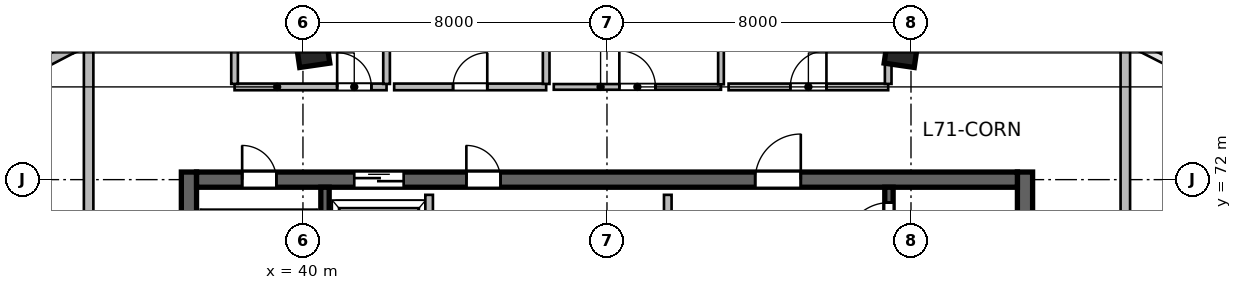
"""IFC4 building model, lengths in metres.
Left out: names, types, materials, properties, quantities, classifications, styles, units other than length and angle.
Written with IfcOpenShell. Run it as: python <this file> out.ifc"""

import sys

from ifc_helpers import new_model, si_unit, direction, frame, frame_2d, origin, origin_2d, place, context, subcontext, project, spatial, rectangle, extrude, source, transform, mapped, element, fill, save


model = new_model("IFC4")
c1 = context("Model", 3, precision=1e-05, world=origin(), true_north=direction((0.0, 1.0)))
c2 = subcontext(c1, "Body", "Model", "MODEL_VIEW")
j1 = project(units=[si_unit("LENGTHUNIT", "METRE"), si_unit("PLANEANGLEUNIT", "RADIAN")], contexts=[c1])
p1 = place(None, origin())
s1 = spatial("IfcSite", under=j1, at=p1, CompositionType="ELEMENT")
p2 = place(p1, origin())
s2 = spatial("IfcBuilding", under=s1, at=p2, CompositionType="ELEMENT")
p3 = place(p2, frame((0.0, 0.0, 291.3)))
s3 = spatial("IfcBuildingStorey", under=s2, at=p3, CompositionType="ELEMENT", Elevation=291.3)
m1 = source(origin(), c2, "Body", "SweptSolid", [
    extrude(rectangle(XDim=12.0, YDim=0.4, at=frame_2d((6.0, 0.0))), origin(), (0.0, 0.0, 1.0), 3.9),
])
for number, where, z_axis, x_axis in (
    (1, (37.0, 60.2, 0.0), (0.0, 0.0, 1.0), (0.0, 1.0, 0.0)),
    (2, (59.0, 60.2, 0.0), (0.0, 0.0, 1.0), (0.0, 1.0, 0.0)),
):
    element("IfcWall", number, at=place(p3, frame(where, z_axis=z_axis, x_axis=x_axis)), inside=s3, PredefinedType="SHEAR", context=c2, shape_type="MappedRepresentation", body=[
        mapped(m1, transform((0.0, 0.0, 0.0), scale=1.0)),
    ])
m2 = source(origin(), c2, "Body", "SweptSolid", [
    extrude(rectangle(XDim=21.6, YDim=0.4, at=frame_2d((10.8, 0.0))), origin(), (0.0, 0.0, 1.0), 3.9),
])
p4 = place(p3, frame((37.2, 72.0, 0.0), z_axis=(0.0, 0.0, 1.0), x_axis=(1.0, 0.0, 0.0)))
e3 = element("IfcWall", 3, at=p4, inside=s3, PredefinedType="SHEAR", context=c2, shape_type="MappedRepresentation", body=[
    mapped(m2, transform((0.0, 0.0, 0.0), scale=1.0)),
])
p5 = place(p4, frame((1.2, 0.0, 0.0)))
e4 = element("IfcOpeningElement", 4, at=p5, cuts=e3, PredefinedType="OPENING", context=c2, shape_type="SweptSolid", body=[
    extrude(rectangle(XDim=0.9, YDim=2.1, at=frame_2d((0.45, 1.05))), frame((0.0, 0.21, 0.0), z_axis=(0.0, -1.0, 0.0), x_axis=(1.0, 0.0, 0.0)), (0.0, 0.0, 1.0), 0.42),
])
p6 = place(p4, frame((14.7, 0.0, 0.0)))
e5 = element("IfcOpeningElement", 5, at=p6, cuts=e3, PredefinedType="OPENING", context=c2, shape_type="SweptSolid", body=[
    extrude(rectangle(XDim=1.2, YDim=2.15, at=frame_2d((0.6, 1.075))), frame((0.0, 0.21, 0.0), z_axis=(0.0, -1.0, 0.0), x_axis=(1.0, 0.0, 0.0)), (0.0, 0.0, 1.0), 0.42),
])
p7 = place(p4, frame((4.15, 0.0, 0.0)))
e6 = element("IfcOpeningElement", 6, at=p7, cuts=e3, PredefinedType="OPENING", context=c2, shape_type="SweptSolid", body=[
    extrude(rectangle(XDim=1.3, YDim=2.15, at=frame_2d((0.65, 1.075))), frame((0.0, 0.21, 0.0), z_axis=(0.0, -1.0, 0.0), x_axis=(1.0, 0.0, 0.0)), (0.0, 0.0, 1.0), 0.42),
])
p8 = place(p4, frame((7.1, 0.0, 0.0)))
e7 = element("IfcOpeningElement", 7, at=p8, cuts=e3, PredefinedType="OPENING", context=c2, shape_type="SweptSolid", body=[
    extrude(rectangle(XDim=0.9, YDim=2.1, at=frame_2d((0.45, 1.05))), frame((0.0, 0.21, 0.0), z_axis=(0.0, -1.0, 0.0), x_axis=(1.0, 0.0, 0.0)), (0.0, 0.0, 1.0), 0.42),
])
m3 = source(origin(), c2, "Body", "SweptSolid", [
    extrude(rectangle(XDim=11.2, YDim=0.22, at=frame_2d((5.6, 0.0))), origin(), (0.0, 0.0, 1.0), 3.9),
])
p9 = place(p3, frame((40.58, 60.6, 0.0), z_axis=(0.0, 0.0, 1.0), x_axis=(0.0, 1.0, 0.0)))
e8 = element("IfcWall", 8, at=p9, inside=s3, PredefinedType="SHEAR", context=c2, shape_type="MappedRepresentation", body=[
    mapped(m3, transform((0.0, 0.0, 0.0), scale=1.0)),
])
p10 = place(p3, frame((55.42, 60.6, 0.0), z_axis=(0.0, 0.0, 1.0), x_axis=(0.0, 1.0, 0.0)))
e9 = element("IfcWall", 9, at=p10, inside=s3, PredefinedType="SHEAR", context=c2, shape_type="MappedRepresentation", body=[
    mapped(m3, transform((0.0, 0.0, 0.0), scale=1.0)),
])
p11 = place(p10, frame((9.645, 0.0, 0.0)))
e10 = element("IfcOpeningElement", 10, at=p11, cuts=e9, PredefinedType="OPENING", context=c2, shape_type="SweptSolid", body=[
    extrude(rectangle(XDim=1.15, YDim=2.15, at=frame_2d((0.575, 1.075))), frame((0.0, 0.12, 0.0), z_axis=(0.0, -1.0, 0.0), x_axis=(1.0, 0.0, 0.0)), (0.0, 0.0, 1.0), 0.24),
])
m4 = source(origin(), c2, "Body", "SweptSolid", [
    extrude(rectangle(XDim=0.8, YDim=0.8, at=origin_2d()), origin(), (0.0, 0.0, 1.0), 3.9),
])
for number, where, z_axis, x_axis in (
    (11, (40.253, 75.404, 0.0), (0.0, 0.0, 1.0), (-0.143, 0.99, 0.0)),
    (12, (55.747, 75.404, 0.0), (0.0, 0.0, 1.0), (0.143, 0.99, 0.0)),
):
    element("IfcColumn", number, at=place(p3, frame(where, z_axis=z_axis, x_axis=x_axis)), inside=s3, PredefinedType="COLUMN", context=c2, shape_type="MappedRepresentation", body=[
        mapped(m4, transform((0.0, 0.0, 0.0), scale=1.0)),
    ])
m5 = source(origin(), c2, "Body", "SweptSolid", [
    extrude(rectangle(XDim=2.711, YDim=0.28, at=frame_2d((1.356, 0.0))), origin(), (0.0, 0.0, 1.0), 3.64),
])
p12 = place(p3, frame((31.502, 74.205, 0.0), z_axis=(0.0, 0.0, 1.0), x_axis=(0.886828760751, 0.462098202881, 0.0)))
e13 = element("IfcWall", 13, at=p12, inside=s3, PredefinedType="SOLIDWALL", context=c2, shape_type="MappedRepresentation", body=[
    mapped(m5, transform((0.0, 0.0, 0.0), scale=1.0)),
])
m6 = source(origin(), c2, "Body", "SweptSolid", [
    extrude(rectangle(XDim=2.673, YDim=0.28, at=frame_2d((1.337, 0.0))), origin(), (0.0, 0.0, 1.0), 3.64),
])
p13 = place(p3, frame((33.907, 75.458, 0.0), z_axis=(0.0, 0.0, 1.0), x_axis=(0.919036345912, 0.394172798266, 0.0)))
e14 = element("IfcWall", 14, at=p13, inside=s3, PredefinedType="SOLIDWALL", context=c2, shape_type="MappedRepresentation", body=[
    mapped(m6, transform((0.0, 0.0, 0.0), scale=1.0)),
])
m7 = source(origin(), c2, "Body", "SweptSolid", [
    extrude(rectangle(XDim=5.8, YDim=0.2, at=frame_2d((2.9, 0.0))), origin(), (0.0, 0.0, 1.0), 3.64),
])
p14 = place(p3, frame((49.6, 65.8, 0.0), z_axis=(0.0, 0.0, 1.0), x_axis=(0.0, 1.0, 0.0)))
e15 = element("IfcWall", 15, at=p14, inside=s3, PredefinedType="SOLIDWALL", context=c2, shape_type="MappedRepresentation", body=[
    mapped(m7, transform((0.0, 0.0, 0.0), scale=1.0)),
])
m8 = source(origin(), c2, "Body", "SweptSolid", [
    extrude(rectangle(XDim=3.2, YDim=0.2, at=frame_2d((1.6, 0.0))), origin(), (0.0, 0.0, 1.0), 3.64),
])
p15 = place(p3, frame((43.32, 68.4, 0.0), z_axis=(0.0, 0.0, 1.0), x_axis=(0.0, 1.0, 0.0)))
e16 = element("IfcWall", 16, at=p15, inside=s3, PredefinedType="SOLIDWALL", context=c2, shape_type="MappedRepresentation", body=[
    mapped(m8, transform((0.0, 0.0, 0.0), scale=1.0)),
])
m9 = source(origin(), c2, "Body", "SweptSolid", [
    extrude(rectangle(XDim=4.0, YDim=0.175, at=frame_2d((2.0, 0.0))), origin(), (0.0, 0.0, 1.0), 3.64),
])
p16 = place(p3, frame((38.2, 74.44, 0.0), z_axis=(0.0, 0.0, 1.0), x_axis=(1.0, 0.0, 0.0)))
e17 = element("IfcWall", 17, at=p16, inside=s3, PredefinedType="PARTITIONING", context=c2, shape_type="MappedRepresentation", body=[
    mapped(m9, transform((0.0, 0.0, 0.0), scale=1.0)),
])
p17 = place(p16, frame((2.7, 0.0, 0.0)))
e18 = element("IfcOpeningElement", 18, at=p17, cuts=e17, PredefinedType="OPENING", context=c2, shape_type="SweptSolid", body=[
    extrude(rectangle(XDim=0.9, YDim=2.08, at=frame_2d((0.45, 1.04))), frame((0.0, 0.098, 0.0), z_axis=(0.0, -1.0, 0.0), x_axis=(1.0, 0.0, 0.0)), (0.0, 0.0, 1.0), 0.195),
])
m10 = source(origin(), c2, "Body", "SweptSolid", [
    extrude(rectangle(XDim=2.403, YDim=0.175, at=frame_2d((1.201, 0.0))), origin(), (0.0, 0.0, 1.0), 3.64),
])
for number, where, z_axis, x_axis in (
    (19, (38.2, 74.519, 0.0), (0.0, 0.0, 1.0), (0.0, 1.0, 0.0)),
    (20, (42.2, 74.519, 0.0), (0.0, 0.0, 1.0), (0.0, 1.0, 0.0)),
):
    element("IfcWall", number, at=place(p3, frame(where, z_axis=z_axis, x_axis=x_axis)), inside=s3, PredefinedType="PARTITIONING", context=c2, shape_type="MappedRepresentation", body=[
        mapped(m10, transform((0.0, 0.0, 0.0), scale=1.0)),
    ])
p18 = place(p3, frame((42.4, 74.44, 0.0), z_axis=(0.0, 0.0, 1.0), x_axis=(1.0, 0.0, 0.0)))
e21 = element("IfcWall", 21, at=p18, inside=s3, PredefinedType="PARTITIONING", context=c2, shape_type="MappedRepresentation", body=[
    mapped(m9, transform((0.0, 0.0, 0.0), scale=1.0)),
])
p19 = place(p18, frame((1.55, 0.0, 0.0)))
e22 = element("IfcOpeningElement", 22, at=p19, cuts=e21, PredefinedType="OPENING", context=c2, shape_type="SweptSolid", body=[
    extrude(rectangle(XDim=0.9, YDim=2.08, at=frame_2d((0.45, 1.04))), frame((0.0, 0.098, 0.0), z_axis=(0.0, -1.0, 0.0), x_axis=(1.0, 0.0, 0.0)), (0.0, 0.0, 1.0), 0.195),
])
p20 = place(p3, frame((46.4, 74.519, 0.0), z_axis=(0.0, 0.0, 1.0), x_axis=(0.0, 1.0, 0.0)))
e23 = element("IfcWall", 23, at=p20, inside=s3, PredefinedType="PARTITIONING", context=c2, shape_type="MappedRepresentation", body=[
    mapped(m10, transform((0.0, 0.0, 0.0), scale=1.0)),
])
m11 = source(origin(), c2, "Body", "SweptSolid", [
    extrude(rectangle(XDim=4.4, YDim=0.15, at=frame_2d((2.2, 0.0))), origin(), (0.0, 0.0, 1.0), 3.64),
])
p21 = place(p3, frame((46.6, 74.44, 0.0), z_axis=(0.0, 0.0, 1.0), x_axis=(1.0, 0.0, 0.0)))
e24 = element("IfcWall", 24, at=p21, inside=s3, PredefinedType="PARTITIONING", context=c2, shape_type="MappedRepresentation", body=[
    mapped(m11, transform((0.0, 0.0, 0.0), scale=1.0)),
])
p22 = place(p21, frame((1.725, 0.0, 0.0)))
e25 = element("IfcOpeningElement", 25, at=p22, cuts=e24, PredefinedType="OPENING", context=c2, shape_type="SweptSolid", body=[
    extrude(rectangle(XDim=0.95, YDim=2.1, at=frame_2d((0.475, 1.05))), frame((0.0, 0.085, 0.0), z_axis=(0.0, -1.0, 0.0), x_axis=(1.0, 0.0, 0.0)), (0.0, 0.0, 1.0), 0.17),
])
m12 = source(origin(), c2, "Body", "SweptSolid", [
    extrude(rectangle(XDim=2.425, YDim=0.15, at=frame_2d((1.212, 0.0))), origin(), (0.0, 0.0, 1.0), 3.64),
])
p23 = place(p3, frame((51.0, 74.508, 0.0), z_axis=(0.0, 0.0, 1.0), x_axis=(0.0, 1.0, 0.0)))
e26 = element("IfcWall", 26, at=p23, inside=s3, PredefinedType="PARTITIONING", context=c2, shape_type="MappedRepresentation", body=[
    mapped(m12, transform((0.0, 0.0, 0.0), scale=1.0)),
])
m13 = source(origin(), c2, "Body", "SweptSolid", [
    extrude(rectangle(XDim=4.2, YDim=0.175, at=frame_2d((2.1, 0.0))), origin(), (0.0, 0.0, 1.0), 3.64),
])
p24 = place(p3, frame((51.2, 74.44, 0.0), z_axis=(0.0, 0.0, 1.0), x_axis=(1.0, 0.0, 0.0)))
e27 = element("IfcWall", 27, at=p24, inside=s3, PredefinedType="PARTITIONING", context=c2, shape_type="MappedRepresentation", body=[
    mapped(m13, transform((0.0, 0.0, 0.0), scale=1.0)),
])
p25 = place(p24, frame((1.625, 0.0, 0.0)))
e28 = element("IfcOpeningElement", 28, at=p25, cuts=e27, PredefinedType="OPENING", context=c2, shape_type="SweptSolid", body=[
    extrude(rectangle(XDim=0.95, YDim=2.12, at=frame_2d((0.475, 1.06))), frame((0.0, 0.098, 0.0), z_axis=(0.0, -1.0, 0.0), x_axis=(1.0, 0.0, 0.0)), (0.0, 0.0, 1.0), 0.195),
])
p26 = place(p3, frame((55.4, 74.519, 0.0), z_axis=(0.0, 0.0, 1.0), x_axis=(0.0, 1.0, 0.0)))
e29 = element("IfcWall", 29, at=p26, inside=s3, PredefinedType="PARTITIONING", context=c2, shape_type="MappedRepresentation", body=[
    mapped(m10, transform((0.0, 0.0, 0.0), scale=1.0)),
])
m14 = source(origin(), c2, "Body", "SweptSolid", [
    extrude(rectangle(XDim=10.141, YDim=0.25, at=frame_2d((5.07, 0.0))), origin(), (0.0, 0.0, 1.0), 3.64),
])
p27 = place(p3, frame((34.36, 65.5, 0.0), z_axis=(0.0, 0.0, 1.0), x_axis=(0.0, 1.0, 0.0)))
e30 = element("IfcWall", 30, at=p27, inside=s3, PredefinedType="PARTITIONING", context=c2, shape_type="MappedRepresentation", body=[
    mapped(m14, transform((0.0, 0.0, 0.0), scale=1.0)),
])
p28 = place(p27, frame((4.521, 0.0, 0.0)))
e31 = element("IfcOpeningElement", 31, at=p28, cuts=e30, PredefinedType="OPENING", context=c2, shape_type="SweptSolid", body=[
    extrude(rectangle(XDim=1.1, YDim=2.15, at=frame_2d((0.55, 1.075))), frame((0.0, 0.135, 0.0), z_axis=(0.0, -1.0, 0.0), x_axis=(1.0, 0.0, 0.0)), (0.0, 0.0, 1.0), 0.27),
])
m15 = source(origin(), c2, "Body", "SweptSolid", [
    extrude(rectangle(XDim=10.153, YDim=0.25, at=frame_2d((5.077, 0.0))), origin(), (0.0, 0.0, 1.0), 3.64),
])
p29 = place(p3, frame((61.64, 65.5, 0.0), z_axis=(0.0, 0.0, 1.0), x_axis=(0.0, 1.0, 0.0)))
e32 = element("IfcWall", 32, at=p29, inside=s3, PredefinedType="PARTITIONING", context=c2, shape_type="MappedRepresentation", body=[
    mapped(m15, transform((0.0, 0.0, 0.0), scale=1.0)),
])
p30 = place(p29, frame((4.602, 0.0, 0.0)))
e33 = element("IfcOpeningElement", 33, at=p30, cuts=e32, PredefinedType="OPENING", context=c2, shape_type="SweptSolid", body=[
    extrude(rectangle(XDim=0.95, YDim=2.1, at=frame_2d((0.475, 1.05))), frame((0.0, 0.135, 0.0), z_axis=(0.0, -1.0, 0.0), x_axis=(1.0, 0.0, 0.0)), (0.0, 0.0, 1.0), 0.27),
])
m16 = source(origin(), c2, "Body", "SweptSolid", [
    extrude(rectangle(XDim=0.9, YDim=2.1, at=frame_2d((0.45, 1.05))), frame((0.0, 0.025, 0.0), z_axis=(0.0, -1.0, 0.0), x_axis=(1.0, 0.0, 0.0)), (0.0, 0.0, 1.0), 0.05),
])
p31 = place(p5, origin())
e34 = element("IfcDoor", 34, at=p31, inside=s3, OperationType="SINGLE_SWING_LEFT", PredefinedType="DOOR", context=c2, shape_type="MappedRepresentation", body=[
    mapped(m16, transform((0.0, 0.0, 0.0), scale=1.0)),
])
fill(e4, e34)
m17 = source(origin(), c2, "Body", "SweptSolid", [
    extrude(rectangle(XDim=1.15, YDim=2.15, at=frame_2d((0.575, 1.075))), frame((0.0, 0.025, 0.0), z_axis=(0.0, -1.0, 0.0), x_axis=(1.0, 0.0, 0.0)), (0.0, 0.0, 1.0), 0.05),
])
p32 = place(p11, origin())
e35 = element("IfcDoor", 35, at=p32, inside=s3, OperationType="SINGLE_SWING_LEFT", PredefinedType="DOOR", context=c2, shape_type="MappedRepresentation", body=[
    mapped(m17, transform((0.0, 0.0, 0.0), scale=1.0)),
])
fill(e10, e35)
m18 = source(origin(), c2, "Body", "SweptSolid", [
    extrude(rectangle(XDim=1.2, YDim=2.15, at=frame_2d((0.6, 1.075))), frame((0.0, 0.025, 0.0), z_axis=(0.0, -1.0, 0.0), x_axis=(1.0, 0.0, 0.0)), (0.0, 0.0, 1.0), 0.05),
])
p33 = place(p6, origin())
e36 = element("IfcDoor", 36, at=p33, inside=s3, OperationType="SINGLE_SWING_RIGHT", PredefinedType="DOOR", context=c2, shape_type="MappedRepresentation", body=[
    mapped(m18, transform((0.0, 0.0, 0.0), scale=1.0)),
])
fill(e5, e36)
m19 = source(origin(), c2, "Body", "SweptSolid", [
    extrude(rectangle(XDim=1.3, YDim=2.15, at=frame_2d((0.65, 1.075))), frame((0.0, 0.025, 0.0), z_axis=(0.0, -1.0, 0.0), x_axis=(1.0, 0.0, 0.0)), (0.0, 0.0, 1.0), 0.05),
])
p34 = place(p7, origin())
e37 = element("IfcDoor", 37, at=p34, inside=s3, OperationType="DOUBLE_DOOR_SLIDING", PredefinedType="DOOR", context=c2, shape_type="MappedRepresentation", body=[
    mapped(m19, transform((0.0, 0.0, 0.0), scale=1.0)),
])
fill(e6, e37)
p35 = place(p8, origin())
e38 = element("IfcDoor", 38, at=p35, inside=s3, OperationType="SINGLE_SWING_LEFT", PredefinedType="DOOR", context=c2, shape_type="MappedRepresentation", body=[
    mapped(m16, transform((0.0, 0.0, 0.0), scale=1.0)),
])
fill(e7, e38)
m20 = source(origin(), c2, "Body", "SweptSolid", [
    extrude(rectangle(XDim=0.9, YDim=2.08, at=frame_2d((0.45, 1.04))), frame((0.0, 0.025, 0.0), z_axis=(0.0, -1.0, 0.0), x_axis=(1.0, 0.0, 0.0)), (0.0, 0.0, 1.0), 0.05),
])
p36 = place(p17, origin())
e39 = element("IfcDoor", 39, at=p36, inside=s3, OperationType="SINGLE_SWING_LEFT", PredefinedType="DOOR", context=c2, shape_type="MappedRepresentation", body=[
    mapped(m20, transform((0.0, 0.0, 0.0), scale=1.0)),
])
fill(e18, e39)
p37 = place(p19, origin())
e40 = element("IfcDoor", 40, at=p37, inside=s3, OperationType="SINGLE_SWING_RIGHT", PredefinedType="DOOR", context=c2, shape_type="MappedRepresentation", body=[
    mapped(m20, transform((0.0, 0.0, 0.0), scale=1.0)),
])
fill(e22, e40)
m21 = source(origin(), c2, "Body", "SweptSolid", [
    extrude(rectangle(XDim=0.95, YDim=2.1, at=frame_2d((0.475, 1.05))), frame((0.0, 0.025, 0.0), z_axis=(0.0, -1.0, 0.0), x_axis=(1.0, 0.0, 0.0)), (0.0, 0.0, 1.0), 0.05),
])
p38 = place(p22, origin())
e41 = element("IfcDoor", 41, at=p38, inside=s3, OperationType="SINGLE_SWING_LEFT", PredefinedType="DOOR", context=c2, shape_type="MappedRepresentation", body=[
    mapped(m21, transform((0.0, 0.0, 0.0), scale=1.0)),
])
fill(e25, e41)
m22 = source(origin(), c2, "Body", "SweptSolid", [
    extrude(rectangle(XDim=0.95, YDim=2.12, at=frame_2d((0.475, 1.06))), frame((0.0, 0.025, 0.0), z_axis=(0.0, -1.0, 0.0), x_axis=(1.0, 0.0, 0.0)), (0.0, 0.0, 1.0), 0.05),
])
p39 = place(p25, origin())
e42 = element("IfcDoor", 42, at=p39, inside=s3, OperationType="SINGLE_SWING_RIGHT", PredefinedType="DOOR", context=c2, shape_type="MappedRepresentation", body=[
    mapped(m22, transform((0.0, 0.0, 0.0), scale=1.0)),
])
fill(e28, e42)
save(model, sys.argv[1])
